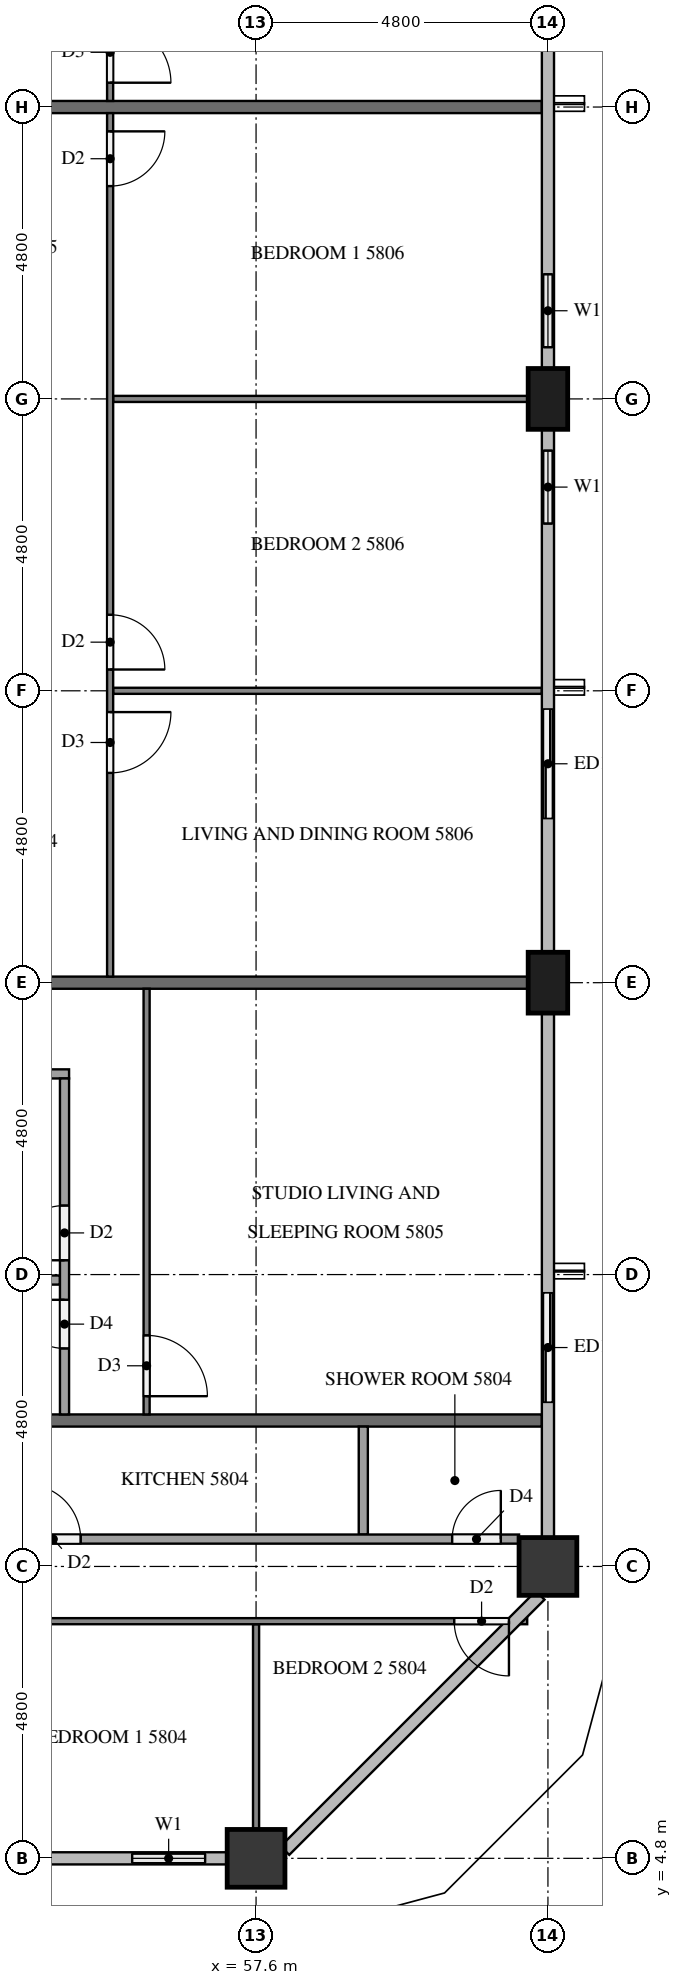
"""IFC4 building model, lengths in metres.
Left out: names, types, materials, properties, quantities, classifications, styles, units other than length and angle.
Written with IfcOpenShell. Run it as: python <this file> out.ifc"""

import sys

from ifc_helpers import new_model, si_unit, direction, frame, frame_2d, origin, origin_2d, place, context, subcontext, project, spatial, rectangle, extrude, element, fill, save


model = new_model("IFC4")
c1 = context("Model", 3, precision=1e-05, world=origin(), true_north=direction((0.0, 1.0)))
c2 = subcontext(c1, "Body", "Model", "MODEL_VIEW")
j1 = project(units=[si_unit("LENGTHUNIT", "METRE"), si_unit("PLANEANGLEUNIT", "RADIAN")], contexts=[c1])
p1 = place(None, origin())
s1 = spatial("IfcSite", under=j1, at=p1, CompositionType="ELEMENT")
p2 = place(p1, origin())
s2 = spatial("IfcBuilding", under=s1, at=p2, CompositionType="ELEMENT")
p3 = place(p2, frame((0.0, 0.0, 222.8)))
s3 = spatial("IfcBuildingStorey", under=s2, at=p3, CompositionType="ELEMENT", Elevation=222.8)
for number, where, z_axis, x_axis in (
    (1, (57.6, 4.8, 0.0), (0.0, 0.0, 1.0), (1.0, 0.0, 0.0)),
    (2, (62.4, 9.6, 0.0), (0.0, 0.0, 1.0), (1.0, 0.0, 0.0)),
):
    element("IfcColumn", number, at=place(p3, frame(where, z_axis=z_axis, x_axis=x_axis)), inside=s3, PredefinedType="COLUMN", context=c2, shape_type="SweptSolid", body=[
        extrude(rectangle(XDim=0.95, YDim=0.95, at=origin_2d()), origin(), (0.0, 0.0, 1.0), 3.2),
    ])
for number, where, z_axis, x_axis in (
    (3, (62.4, 19.2, 0.0), (0.0, 0.0, 1.0), (0.0, 1.0, 0.0)),
    (4, (62.4, 28.8, 0.0), (0.0, 0.0, 1.0), (0.0, 1.0, 0.0)),
):
    element("IfcColumn", number, at=place(p3, frame(where, z_axis=z_axis, x_axis=x_axis)), inside=s3, PredefinedType="COLUMN", context=c2, shape_type="SweptSolid", body=[
        extrude(rectangle(XDim=1.0, YDim=0.65, at=origin_2d()), origin(), (0.0, 0.0, 1.0), 3.2),
    ])
p4 = place(p3, frame((55.2, 4.8, 0.0), z_axis=(0.0, 0.0, 1.0), x_axis=(1.0, 0.0, 0.0)))
e5 = element("IfcWall", 5, at=p4, inside=s3, PredefinedType="SOLIDWALL", context=c2, shape_type="SweptSolid", body=[
    extrude(rectangle(XDim=1.925, YDim=0.15, at=frame_2d((0.962, 0.0))), origin(), (0.0, 0.0, 1.0), 3.2),
])
p5 = place(p4, frame((0.363, 0.0, 0.9)))
e6 = element("IfcOpeningElement", 6, at=p5, cuts=e5, PredefinedType="OPENING", context=c2, shape_type="SweptSolid", body=[
    extrude(rectangle(XDim=1.2, YDim=1.4, at=frame_2d((0.6, 0.7))), frame((0.0, 0.085, 0.0), z_axis=(0.0, -1.0, 0.0), x_axis=(1.0, 0.0, 0.0)), (0.0, 0.0, 1.0), 0.17),
])
p6 = place(p3, frame((62.4, 12.0, 0.0), z_axis=(0.0, 0.0, 1.0), x_axis=(0.0, 1.0, 0.0)))
e7 = element("IfcWall", 7, at=p6, inside=s3, PredefinedType="SOLIDWALL", context=c2, shape_type="SweptSolid", body=[
    extrude(rectangle(XDim=2.4, YDim=0.15, at=frame_2d((1.2, 0.0))), origin(), (0.0, 0.0, 1.0), 3.2),
])
p7 = place(p6, frame((0.3, 0.0, 0.0)))
e8 = element("IfcOpeningElement", 8, at=p7, cuts=e7, PredefinedType="OPENING", context=c2, shape_type="SweptSolid", body=[
    extrude(rectangle(XDim=1.8, YDim=2.4, at=frame_2d((0.9, 1.2))), frame((0.0, 0.085, 0.0), z_axis=(0.0, -1.0, 0.0), x_axis=(1.0, 0.0, 0.0)), (0.0, 0.0, 1.0), 0.17),
])
p8 = place(p3, frame((62.4, 21.6, 0.0), z_axis=(0.0, 0.0, 1.0), x_axis=(0.0, 1.0, 0.0)))
e9 = element("IfcWall", 9, at=p8, inside=s3, PredefinedType="SOLIDWALL", context=c2, shape_type="SweptSolid", body=[
    extrude(rectangle(XDim=2.4, YDim=0.15, at=frame_2d((1.2, 0.0))), origin(), (0.0, 0.0, 1.0), 3.2),
])
p9 = place(p8, frame((0.3, 0.0, 0.0)))
e10 = element("IfcOpeningElement", 10, at=p9, cuts=e9, PredefinedType="OPENING", context=c2, shape_type="SweptSolid", body=[
    extrude(rectangle(XDim=1.8, YDim=2.4, at=frame_2d((0.9, 1.2))), frame((0.0, 0.085, 0.0), z_axis=(0.0, -1.0, 0.0), x_axis=(1.0, 0.0, 0.0)), (0.0, 0.0, 1.0), 0.17),
])
p10 = place(p3, frame((62.4, 26.4, 0.0), z_axis=(0.0, 0.0, 1.0), x_axis=(0.0, 1.0, 0.0)))
e11 = element("IfcWall", 11, at=p10, inside=s3, PredefinedType="SOLIDWALL", context=c2, shape_type="SweptSolid", body=[
    extrude(rectangle(XDim=1.9, YDim=0.15, at=frame_2d((0.95, 0.0))), origin(), (0.0, 0.0, 1.0), 3.2),
])
p11 = place(p10, frame((0.35, 0.0, 0.9)))
e12 = element("IfcOpeningElement", 12, at=p11, cuts=e11, PredefinedType="OPENING", context=c2, shape_type="SweptSolid", body=[
    extrude(rectangle(XDim=1.2, YDim=1.4, at=frame_2d((0.6, 0.7))), frame((0.0, 0.085, 0.0), z_axis=(0.0, -1.0, 0.0), x_axis=(1.0, 0.0, 0.0)), (0.0, 0.0, 1.0), 0.17),
])
p12 = place(p3, frame((62.4, 29.3, 0.0), z_axis=(0.0, 0.0, 1.0), x_axis=(0.0, 1.0, 0.0)))
e13 = element("IfcWall", 13, at=p12, inside=s3, PredefinedType="SOLIDWALL", context=c2, shape_type="SweptSolid", body=[
    extrude(rectangle(XDim=1.9, YDim=0.15, at=frame_2d((0.95, 0.0))), origin(), (0.0, 0.0, 1.0), 3.2),
])
p13 = place(p12, frame((0.35, 0.0, 0.9)))
e14 = element("IfcOpeningElement", 14, at=p13, cuts=e13, PredefinedType="OPENING", context=c2, shape_type="SweptSolid", body=[
    extrude(rectangle(XDim=1.2, YDim=1.4, at=frame_2d((0.6, 0.7))), frame((0.0, 0.085, 0.0), z_axis=(0.0, -1.0, 0.0), x_axis=(1.0, 0.0, 0.0)), (0.0, 0.0, 1.0), 0.17),
])
p14 = place(p3, frame((50.5, 12.0, 0.0), z_axis=(0.0, 0.0, 1.0), x_axis=(1.0, 0.0, 0.0)))
e15 = element("IfcWall", 15, at=p14, inside=s3, PredefinedType="PARTITIONING", context=c2, shape_type="SweptSolid", body=[
    extrude(rectangle(XDim=11.8, YDim=0.2, at=frame_2d((5.9, 0.0))), origin(), (0.0, 0.0, 1.0), 3.2),
])
p15 = place(p3, frame((50.5, 19.2, 0.0), z_axis=(0.0, 0.0, 1.0), x_axis=(1.0, 0.0, 0.0)))
e16 = element("IfcWall", 16, at=p15, inside=s3, PredefinedType="PARTITIONING", context=c2, shape_type="SweptSolid", body=[
    extrude(rectangle(XDim=11.575, YDim=0.2, at=frame_2d((5.788, 0.0))), origin(), (0.0, 0.0, 1.0), 3.2),
])
p16 = place(p3, frame((50.5, 33.6, 0.0), z_axis=(0.0, 0.0, 1.0), x_axis=(1.0, 0.0, 0.0)))
e17 = element("IfcWall", 17, at=p16, inside=s3, PredefinedType="PARTITIONING", context=c2, shape_type="SweptSolid", body=[
    extrude(rectangle(XDim=11.8, YDim=0.2, at=frame_2d((5.9, 0.0))), origin(), (0.0, 0.0, 1.0), 3.2),
])
p17 = place(p3, frame((57.6, 8.65, 0.0), z_axis=(0.0, 0.0, 1.0), x_axis=(0.0, -1.0, 0.0)))
e18 = element("IfcWall", 18, at=p17, inside=s3, PredefinedType="PARTITIONING", context=c2, shape_type="SweptSolid", body=[
    extrude(rectangle(XDim=3.375, YDim=0.1, at=frame_2d((1.688, 0.0))), origin(), (0.0, 0.0, 1.0), 3.2),
])
p18 = place(p3, frame((62.059, 8.7, 0.0), z_axis=(0.0, 0.0, 1.0), x_axis=(-1.0, 0.0, 0.0)))
e19 = element("IfcWall", 19, at=p18, inside=s3, PredefinedType="PARTITIONING", context=c2, shape_type="SweptSolid", body=[
    extrude(rectangle(XDim=13.959, YDim=0.1, at=frame_2d((6.979, 0.0))), origin(), (0.0, 0.0, 1.0), 3.2),
])
p19 = place(p18, frame((9.609, 0.0, 0.0)))
e20 = element("IfcOpeningElement", 20, at=p19, cuts=e19, PredefinedType="OPENING", context=c2, shape_type="SweptSolid", body=[
    extrude(rectangle(XDim=1.0, YDim=2.1, at=frame_2d((0.5, 1.05))), frame((0.0, 0.06, 0.0), z_axis=(0.0, -1.0, 0.0), x_axis=(1.0, 0.0, 0.0)), (0.0, 0.0, 1.0), 0.12),
])
p20 = place(p18, frame((8.009, 0.0, 0.0)))
e21 = element("IfcOpeningElement", 21, at=p20, cuts=e19, PredefinedType="OPENING", context=c2, shape_type="SweptSolid", body=[
    extrude(rectangle(XDim=0.9, YDim=2.1, at=frame_2d((0.45, 1.05))), frame((0.0, 0.06, 0.0), z_axis=(0.0, -1.0, 0.0), x_axis=(1.0, 0.0, 0.0)), (0.0, 0.0, 1.0), 0.12),
])
p21 = place(p18, frame((0.3, 0.0, 0.0)))
e22 = element("IfcOpeningElement", 22, at=p21, cuts=e19, PredefinedType="OPENING", context=c2, shape_type="SweptSolid", body=[
    extrude(rectangle(XDim=0.9, YDim=2.1, at=frame_2d((0.45, 1.05))), frame((0.0, 0.06, 0.0), z_axis=(0.0, -1.0, 0.0), x_axis=(1.0, 0.0, 0.0)), (0.0, 0.0, 1.0), 0.12),
])
p22 = place(p3, frame((59.364, 11.9, 0.0), z_axis=(0.0, 0.0, 1.0), x_axis=(0.0, -1.0, 0.0)))
e23 = element("IfcWall", 23, at=p22, inside=s3, PredefinedType="PARTITIONING", context=c2, shape_type="SweptSolid", body=[
    extrude(rectangle(XDim=1.775, YDim=0.15, at=frame_2d((0.887, 0.0))), origin(), (0.0, 0.0, 1.0), 3.2),
])
p23 = place(p3, frame((49.575, 10.05, 0.0), z_axis=(0.0, 0.0, 1.0), x_axis=(1.0, 0.0, 0.0)))
e24 = element("IfcWall", 24, at=p23, inside=s3, PredefinedType="PARTITIONING", context=c2, shape_type="SweptSolid", body=[
    extrude(rectangle(XDim=12.35, YDim=0.15, at=frame_2d((6.175, 0.0))), origin(), (0.0, 0.0, 1.0), 3.2),
])
p24 = place(p23, frame((2.69, 0.0, 0.0)))
e25 = element("IfcOpeningElement", 25, at=p24, cuts=e24, PredefinedType="OPENING", context=c2, shape_type="SweptSolid", body=[
    extrude(rectangle(XDim=0.9, YDim=2.1, at=frame_2d((0.45, 1.05))), frame((0.0, 0.085, 0.0), z_axis=(0.0, -1.0, 0.0), x_axis=(1.0, 0.0, 0.0)), (0.0, 0.0, 1.0), 0.17),
])
p25 = place(p23, frame((4.24, 0.0, 0.0)))
e26 = element("IfcOpeningElement", 26, at=p25, cuts=e24, PredefinedType="OPENING", context=c2, shape_type="SweptSolid", body=[
    extrude(rectangle(XDim=0.9, YDim=2.1, at=frame_2d((0.45, 1.05))), frame((0.0, 0.085, 0.0), z_axis=(0.0, -1.0, 0.0), x_axis=(1.0, 0.0, 0.0)), (0.0, 0.0, 1.0), 0.17),
])
p26 = place(p23, frame((11.25, 0.0, 0.0)))
e27 = element("IfcOpeningElement", 27, at=p26, cuts=e24, PredefinedType="OPENING", context=c2, shape_type="SweptSolid", body=[
    extrude(rectangle(XDim=0.8, YDim=2.1, at=frame_2d((0.4, 1.05))), frame((0.0, 0.085, 0.0), z_axis=(0.0, -1.0, 0.0), x_axis=(1.0, 0.0, 0.0)), (0.0, 0.0, 1.0), 0.17),
])
p27 = place(p3, frame((55.8, 19.1, 0.0), z_axis=(0.0, 0.0, 1.0), x_axis=(0.0, -1.0, 0.0)))
e28 = element("IfcWall", 28, at=p27, inside=s3, PredefinedType="PARTITIONING", context=c2, shape_type="SweptSolid", body=[
    extrude(rectangle(XDim=7.0, YDim=0.1, at=frame_2d((3.5, 0.0))), origin(), (0.0, 0.0, 1.0), 3.2),
])
p28 = place(p27, frame((5.7, 0.0, 0.0)))
e29 = element("IfcOpeningElement", 29, at=p28, cuts=e28, PredefinedType="OPENING", context=c2, shape_type="SweptSolid", body=[
    extrude(rectangle(XDim=1.0, YDim=2.1, at=frame_2d((0.5, 1.05))), frame((0.0, 0.06, 0.0), z_axis=(0.0, -1.0, 0.0), x_axis=(1.0, 0.0, 0.0)), (0.0, 0.0, 1.0), 0.12),
])
p29 = place(p3, frame((50.5, 14.31, 0.0), z_axis=(0.0, 0.0, 1.0), x_axis=(1.0, 0.0, 0.0)))
e30 = element("IfcWall", 30, at=p29, inside=s3, PredefinedType="PARTITIONING", context=c2, shape_type="SweptSolid", body=[
    extrude(rectangle(XDim=3.875, YDim=0.15, at=frame_2d((1.938, 0.0))), origin(), (0.0, 0.0, 1.0), 3.2),
])
p30 = place(p3, frame((50.5, 17.7, 0.0), z_axis=(0.0, 0.0, 1.0), x_axis=(1.0, 0.0, 0.0)))
e31 = element("IfcWall", 31, at=p30, inside=s3, PredefinedType="PARTITIONING", context=c2, shape_type="SweptSolid", body=[
    extrude(rectangle(XDim=4.025, YDim=0.15, at=frame_2d((2.012, 0.0))), origin(), (0.0, 0.0, 1.0), 3.2),
])
p31 = place(p3, frame((54.45, 12.1, 0.0), z_axis=(0.0, 0.0, 1.0), x_axis=(0.0, 1.0, 0.0)))
e32 = element("IfcWall", 32, at=p31, inside=s3, PredefinedType="PARTITIONING", context=c2, shape_type="SweptSolid", body=[
    extrude(rectangle(XDim=5.525, YDim=0.15, at=frame_2d((2.762, 0.0))), origin(), (0.0, 0.0, 1.0), 3.2),
])
p32 = place(p31, frame((2.535, 0.0, 0.0)))
e33 = element("IfcOpeningElement", 33, at=p32, cuts=e32, PredefinedType="OPENING", context=c2, shape_type="SweptSolid", body=[
    extrude(rectangle(XDim=0.9, YDim=2.1, at=frame_2d((0.45, 1.05))), frame((0.0, 0.085, 0.0), z_axis=(0.0, -1.0, 0.0), x_axis=(1.0, 0.0, 0.0)), (0.0, 0.0, 1.0), 0.17),
])
p33 = place(p31, frame((1.085, 0.0, 0.0)))
e34 = element("IfcOpeningElement", 34, at=p33, cuts=e32, PredefinedType="OPENING", context=c2, shape_type="SweptSolid", body=[
    extrude(rectangle(XDim=0.8, YDim=2.1, at=frame_2d((0.4, 1.05))), frame((0.0, 0.085, 0.0), z_axis=(0.0, -1.0, 0.0), x_axis=(1.0, 0.0, 0.0)), (0.0, 0.0, 1.0), 0.17),
])
p34 = place(p3, frame((55.25, 28.8, 0.0), z_axis=(0.0, 0.0, 1.0), x_axis=(1.0, 0.0, 0.0)))
e35 = element("IfcWall", 35, at=p34, inside=s3, PredefinedType="PARTITIONING", context=c2, shape_type="SweptSolid", body=[
    extrude(rectangle(XDim=6.825, YDim=0.1, at=frame_2d((3.413, 0.0))), origin(), (0.0, 0.0, 1.0), 3.2),
])
p35 = place(p3, frame((55.25, 24.0, 0.0), z_axis=(0.0, 0.0, 1.0), x_axis=(1.0, 0.0, 0.0)))
e36 = element("IfcWall", 36, at=p35, inside=s3, PredefinedType="PARTITIONING", context=c2, shape_type="SweptSolid", body=[
    extrude(rectangle(XDim=7.05, YDim=0.1, at=frame_2d((3.525, 0.0))), origin(), (0.0, 0.0, 1.0), 3.2),
])
p36 = place(p3, frame((55.2, 33.5, 0.0), z_axis=(0.0, 0.0, 1.0), x_axis=(0.0, -1.0, 0.0)))
e37 = element("IfcWall", 37, at=p36, inside=s3, PredefinedType="PARTITIONING", context=c2, shape_type="SweptSolid", body=[
    extrude(rectangle(XDim=14.2, YDim=0.1, at=frame_2d((7.1, 0.0))), origin(), (0.0, 0.0, 1.0), 3.2),
])
p37 = place(p36, frame((0.3, 0.0, 0.0)))
e38 = element("IfcOpeningElement", 38, at=p37, cuts=e37, PredefinedType="OPENING", context=c2, shape_type="SweptSolid", body=[
    extrude(rectangle(XDim=0.9, YDim=2.1, at=frame_2d((0.45, 1.05))), frame((0.0, 0.06, 0.0), z_axis=(0.0, -1.0, 0.0), x_axis=(1.0, 0.0, 0.0)), (0.0, 0.0, 1.0), 0.12),
])
p38 = place(p36, frame((8.25, 0.0, 0.0)))
e39 = element("IfcOpeningElement", 39, at=p38, cuts=e37, PredefinedType="OPENING", context=c2, shape_type="SweptSolid", body=[
    extrude(rectangle(XDim=0.9, YDim=2.1, at=frame_2d((0.45, 1.05))), frame((0.0, 0.06, 0.0), z_axis=(0.0, -1.0, 0.0), x_axis=(1.0, 0.0, 0.0)), (0.0, 0.0, 1.0), 0.12),
])
p39 = place(p36, frame((9.85, 0.0, 0.0)))
e40 = element("IfcOpeningElement", 40, at=p39, cuts=e37, PredefinedType="OPENING", context=c2, shape_type="SweptSolid", body=[
    extrude(rectangle(XDim=1.0, YDim=2.1, at=frame_2d((0.5, 1.05))), frame((0.0, 0.06, 0.0), z_axis=(0.0, -1.0, 0.0), x_axis=(1.0, 0.0, 0.0)), (0.0, 0.0, 1.0), 0.12),
])
p40 = place(p3, frame((55.2, 40.7, 0.0), z_axis=(0.0, 0.0, 1.0), x_axis=(0.0, -1.0, 0.0)))
e41 = element("IfcWall", 41, at=p40, inside=s3, PredefinedType="PARTITIONING", context=c2, shape_type="SweptSolid", body=[
    extrude(rectangle(XDim=7.0, YDim=0.1, at=frame_2d((3.5, 0.0))), origin(), (0.0, 0.0, 1.0), 3.2),
])
p41 = place(p40, frame((5.7, 0.0, 0.0)))
e42 = element("IfcOpeningElement", 42, at=p41, cuts=e41, PredefinedType="OPENING", context=c2, shape_type="SweptSolid", body=[
    extrude(rectangle(XDim=1.0, YDim=2.1, at=frame_2d((0.5, 1.05))), frame((0.0, 0.06, 0.0), z_axis=(0.0, -1.0, 0.0), x_axis=(1.0, 0.0, 0.0)), (0.0, 0.0, 1.0), 0.12),
])
p42 = place(p5, origin())
e43 = element("IfcWindow", 43, at=p42, inside=s3, PartitioningType="SINGLE_PANEL", PredefinedType="WINDOW", context=c2, shape_type="SweptSolid", body=[
    extrude(rectangle(XDim=1.2, YDim=1.4, at=frame_2d((0.6, 0.7))), frame((0.0, 0.03, 0.0), z_axis=(0.0, -1.0, 0.0), x_axis=(1.0, 0.0, 0.0)), (0.0, 0.0, 1.0), 0.06),
])
fill(e6, e43)
p43 = place(p7, origin())
e44 = element("IfcDoor", 44, at=p43, inside=s3, OperationType="SLIDING_TO_LEFT", PredefinedType="DOOR", context=c2, shape_type="SweptSolid", body=[
    extrude(rectangle(XDim=1.8, YDim=2.4, at=frame_2d((0.9, 1.2))), frame((0.0, 0.025, 0.0), z_axis=(0.0, -1.0, 0.0), x_axis=(1.0, 0.0, 0.0)), (0.0, 0.0, 1.0), 0.05),
])
fill(e8, e44)
p44 = place(p9, origin())
e45 = element("IfcDoor", 45, at=p44, inside=s3, OperationType="SLIDING_TO_RIGHT", PredefinedType="DOOR", context=c2, shape_type="SweptSolid", body=[
    extrude(rectangle(XDim=1.8, YDim=2.4, at=frame_2d((0.9, 1.2))), frame((0.0, 0.025, 0.0), z_axis=(0.0, -1.0, 0.0), x_axis=(1.0, 0.0, 0.0)), (0.0, 0.0, 1.0), 0.05),
])
fill(e10, e45)
p45 = place(p11, origin())
e46 = element("IfcWindow", 46, at=p45, inside=s3, PartitioningType="SINGLE_PANEL", PredefinedType="WINDOW", context=c2, shape_type="SweptSolid", body=[
    extrude(rectangle(XDim=1.2, YDim=1.4, at=frame_2d((0.6, 0.7))), frame((0.0, 0.03, 0.0), z_axis=(0.0, -1.0, 0.0), x_axis=(1.0, 0.0, 0.0)), (0.0, 0.0, 1.0), 0.06),
])
fill(e12, e46)
p46 = place(p13, origin())
e47 = element("IfcWindow", 47, at=p46, inside=s3, PartitioningType="SINGLE_PANEL", PredefinedType="WINDOW", context=c2, shape_type="SweptSolid", body=[
    extrude(rectangle(XDim=1.2, YDim=1.4, at=frame_2d((0.6, 0.7))), frame((0.0, 0.03, 0.0), z_axis=(0.0, -1.0, 0.0), x_axis=(1.0, 0.0, 0.0)), (0.0, 0.0, 1.0), 0.06),
])
fill(e14, e47)
p47 = place(p21, origin())
e48 = element("IfcDoor", 48, at=p47, inside=s3, OperationType="SINGLE_SWING_LEFT", PredefinedType="DOOR", context=c2, shape_type="SweptSolid", body=[
    extrude(rectangle(XDim=0.9, YDim=2.1, at=frame_2d((0.45, 1.05))), frame((0.0, 0.025, 0.0), z_axis=(0.0, -1.0, 0.0), x_axis=(1.0, 0.0, 0.0)), (0.0, 0.0, 1.0), 0.05),
])
fill(e22, e48)
p48 = place(p25, origin())
e49 = element("IfcDoor", 49, at=p48, inside=s3, OperationType="SINGLE_SWING_LEFT", PredefinedType="DOOR", context=c2, shape_type="SweptSolid", body=[
    extrude(rectangle(XDim=0.9, YDim=2.1, at=frame_2d((0.45, 1.05))), frame((0.0, 0.025, 0.0), z_axis=(0.0, -1.0, 0.0), x_axis=(1.0, 0.0, 0.0)), (0.0, 0.0, 1.0), 0.05),
])
fill(e26, e49)
p49 = place(p26, origin())
e50 = element("IfcDoor", 50, at=p49, inside=s3, OperationType="SINGLE_SWING_RIGHT", PredefinedType="DOOR", context=c2, shape_type="SweptSolid", body=[
    extrude(rectangle(XDim=0.8, YDim=2.1, at=frame_2d((0.4, 1.05))), frame((0.0, 0.025, 0.0), z_axis=(0.0, -1.0, 0.0), x_axis=(1.0, 0.0, 0.0)), (0.0, 0.0, 1.0), 0.05),
])
fill(e27, e50)
p50 = place(p28, origin())
e51 = element("IfcDoor", 51, at=p50, inside=s3, OperationType="SINGLE_SWING_RIGHT", PredefinedType="DOOR", context=c2, shape_type="SweptSolid", body=[
    extrude(rectangle(XDim=1.0, YDim=2.1, at=frame_2d((0.5, 1.05))), frame((0.0, 0.025, 0.0), z_axis=(0.0, -1.0, 0.0), x_axis=(1.0, 0.0, 0.0)), (0.0, 0.0, 1.0), 0.05),
])
fill(e29, e51)
p51 = place(p32, origin())
e52 = element("IfcDoor", 52, at=p51, inside=s3, OperationType="SINGLE_SWING_LEFT", PredefinedType="DOOR", context=c2, shape_type="SweptSolid", body=[
    extrude(rectangle(XDim=0.9, YDim=2.1, at=frame_2d((0.45, 1.05))), frame((0.0, 0.025, 0.0), z_axis=(0.0, -1.0, 0.0), x_axis=(1.0, 0.0, 0.0)), (0.0, 0.0, 1.0), 0.05),
])
fill(e33, e52)
p52 = place(p33, origin())
e53 = element("IfcDoor", 53, at=p52, inside=s3, OperationType="SINGLE_SWING_RIGHT", PredefinedType="DOOR", context=c2, shape_type="SweptSolid", body=[
    extrude(rectangle(XDim=0.8, YDim=2.1, at=frame_2d((0.4, 1.05))), frame((0.0, 0.025, 0.0), z_axis=(0.0, -1.0, 0.0), x_axis=(1.0, 0.0, 0.0)), (0.0, 0.0, 1.0), 0.05),
])
fill(e34, e53)
p53 = place(p37, origin())
e54 = element("IfcDoor", 54, at=p53, inside=s3, OperationType="SINGLE_SWING_LEFT", PredefinedType="DOOR", context=c2, shape_type="SweptSolid", body=[
    extrude(rectangle(XDim=0.9, YDim=2.1, at=frame_2d((0.45, 1.05))), frame((0.0, 0.025, 0.0), z_axis=(0.0, -1.0, 0.0), x_axis=(1.0, 0.0, 0.0)), (0.0, 0.0, 1.0), 0.05),
])
fill(e38, e54)
p54 = place(p38, origin())
e55 = element("IfcDoor", 55, at=p54, inside=s3, OperationType="SINGLE_SWING_RIGHT", PredefinedType="DOOR", context=c2, shape_type="SweptSolid", body=[
    extrude(rectangle(XDim=0.9, YDim=2.1, at=frame_2d((0.45, 1.05))), frame((0.0, 0.025, 0.0), z_axis=(0.0, -1.0, 0.0), x_axis=(1.0, 0.0, 0.0)), (0.0, 0.0, 1.0), 0.05),
])
fill(e39, e55)
p55 = place(p39, origin())
e56 = element("IfcDoor", 56, at=p55, inside=s3, OperationType="SINGLE_SWING_LEFT", PredefinedType="DOOR", context=c2, shape_type="SweptSolid", body=[
    extrude(rectangle(XDim=1.0, YDim=2.1, at=frame_2d((0.5, 1.05))), frame((0.0, 0.025, 0.0), z_axis=(0.0, -1.0, 0.0), x_axis=(1.0, 0.0, 0.0)), (0.0, 0.0, 1.0), 0.05),
])
fill(e40, e56)
p56 = place(p41, origin())
e57 = element("IfcDoor", 57, at=p56, inside=s3, OperationType="SINGLE_SWING_RIGHT", PredefinedType="DOOR", context=c2, shape_type="SweptSolid", body=[
    extrude(rectangle(XDim=1.0, YDim=2.1, at=frame_2d((0.5, 1.05))), frame((0.0, 0.025, 0.0), z_axis=(0.0, -1.0, 0.0), x_axis=(1.0, 0.0, 0.0)), (0.0, 0.0, 1.0), 0.05),
])
fill(e42, e57)
save(model, sys.argv[1])
